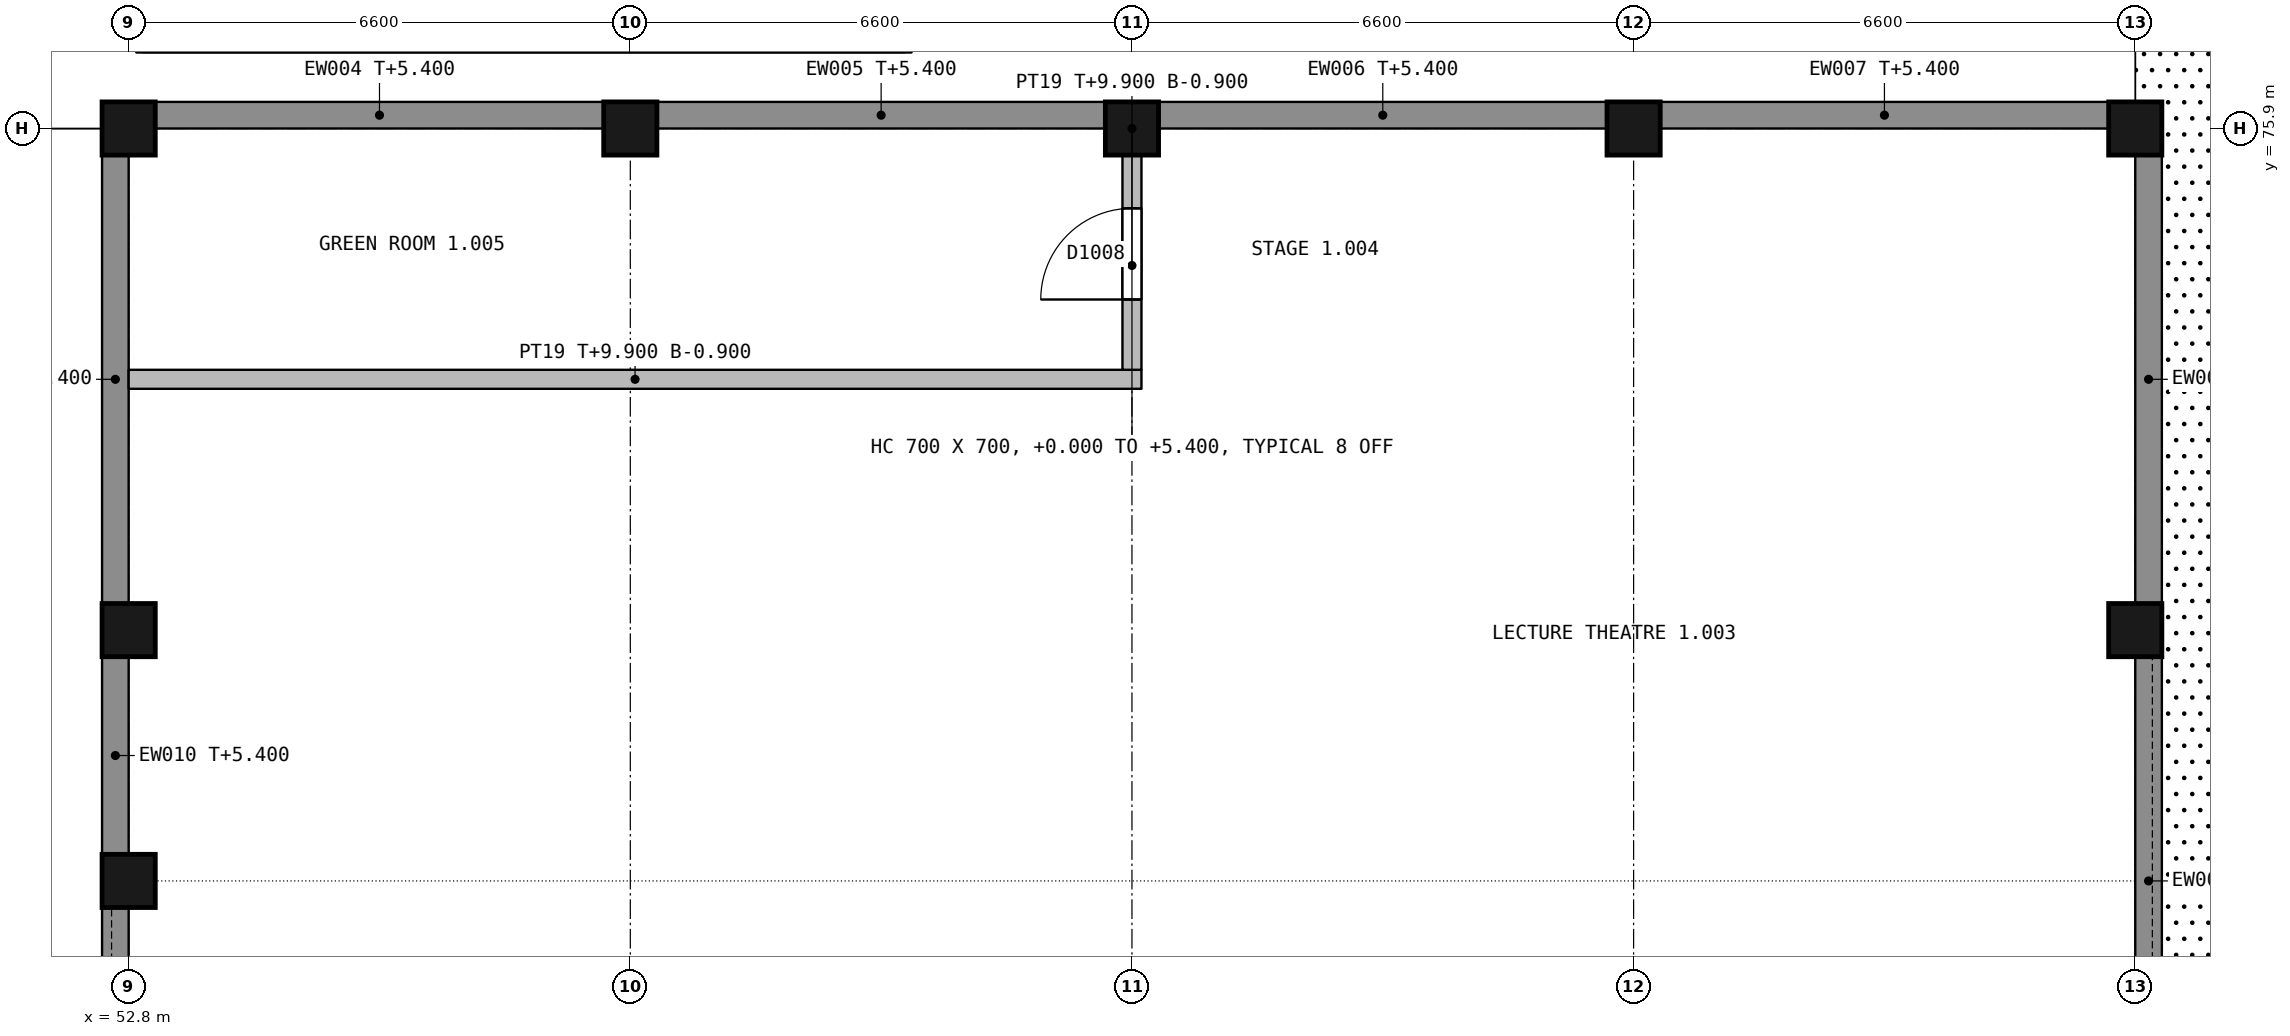
"""IFC4 building model, lengths in metres.
Left out: names, types, materials, properties, quantities, classifications, styles, units other than length and angle.
Written with IfcOpenShell. Run it as: python <this file> out.ifc"""

import sys

from ifc_helpers import new_model, si_unit, direction, frame, frame_2d, origin, origin_2d, place, context, subcontext, project, spatial, rectangle, extrude, element, fill, save


model = new_model("IFC4")
c1 = context("Model", 3, precision=1e-05, world=origin(), true_north=direction((0.0, 1.0)))
c2 = subcontext(c1, "Body", "Model", "MODEL_VIEW")
j1 = project(units=[si_unit("LENGTHUNIT", "METRE"), si_unit("PLANEANGLEUNIT", "RADIAN")], contexts=[c1])
p1 = place(None, origin())
s1 = spatial("IfcSite", under=j1, at=p1, CompositionType="ELEMENT")
p2 = place(p1, origin())
s2 = spatial("IfcBuilding", under=s1, at=p2, CompositionType="ELEMENT")
p3 = place(p2, origin())
s3 = spatial("IfcBuildingStorey", under=s2, at=p3, CompositionType="ELEMENT", Elevation=0.0)
for number, where, z_axis, x_axis in (
    (1, (52.8, 69.3, 0.0), (0.0, 0.0, 1.0), (1.0, 0.0, 0.0)),
    (2, (52.8, 75.9, 0.0), (0.0, 0.0, 1.0), (1.0, 0.0, 0.0)),
    (3, (79.2, 69.3, 0.0), (0.0, 0.0, 1.0), (1.0, 0.0, 0.0)),
    (4, (79.2, 75.9, 0.0), (0.0, 0.0, 1.0), (1.0, 0.0, 0.0)),
    (5, (59.4, 75.9, 0.0), (0.0, 0.0, 1.0), (1.0, 0.0, 0.0)),
    (6, (66.0, 75.9, 0.0), (0.0, 0.0, 1.0), (1.0, 0.0, 0.0)),
    (7, (72.6, 75.9, 0.0), (0.0, 0.0, 1.0), (1.0, 0.0, 0.0)),
    (8, (52.8, 66.0, 0.0), (0.0, 0.0, 1.0), (1.0, 0.0, 0.0)),
):
    element("IfcColumn", number, at=place(p3, frame(where, z_axis=z_axis, x_axis=x_axis)), inside=s3, PredefinedType="COLUMN", context=c2, shape_type="SweptSolid", body=[
        extrude(rectangle(XDim=0.7, YDim=0.7, at=origin_2d()), origin(), (0.0, 0.0, 1.0), 5.4),
    ])
p4 = place(p3, frame((79.375, 68.95, 0.0), z_axis=(0.0, 0.0, 1.0), x_axis=(0.0, -1.0, 0.0)))
e9 = element("IfcWall", 9, at=p4, inside=s3, PredefinedType="STANDARD", context=c2, shape_type="SweptSolid", body=[
    extrude(rectangle(XDim=5.9, YDim=0.35, at=frame_2d((2.95, 0.0))), origin(), (0.0, 0.0, 1.0), 4.35),
])
for number, where, z_axis, x_axis in (
    (10, (79.375, 75.55, 0.0), (0.0, 0.0, 1.0), (0.0, -1.0, 0.0)),
    (11, (53.15, 76.075, 0.0), (0.0, 0.0, 1.0), (1.0, 0.0, 0.0)),
):
    element("IfcWall", number, at=place(p3, frame(where, z_axis=z_axis, x_axis=x_axis)), inside=s3, PredefinedType="STANDARD", context=c2, shape_type="SweptSolid", body=[
        extrude(rectangle(XDim=5.9, YDim=0.35, at=frame_2d((2.95, 0.0))), origin(), (0.0, 0.0, 1.0), 5.4),
    ])
for number, where, z_axis, x_axis in (
    (12, (59.75, 76.075, 0.0), (0.0, 0.0, 1.0), (1.0, 0.0, 0.0)),
    (13, (66.35, 76.075, 0.0), (0.0, 0.0, 1.0), (1.0, 0.0, 0.0)),
):
    element("IfcWall", number, at=place(p3, frame(where, z_axis=z_axis, x_axis=x_axis)), inside=s3, PredefinedType="STANDARD", context=c2, shape_type="SweptSolid", body=[
        extrude(rectangle(XDim=5.9, YDim=0.35, at=frame_2d((2.95, 0.0))), origin(), (0.0, 0.0, 1.0), 5.4),
    ])
p5 = place(p3, frame((72.95, 76.075, 0.0), z_axis=(0.0, 0.0, 1.0), x_axis=(1.0, 0.0, 0.0)))
e14 = element("IfcWall", 14, at=p5, inside=s3, PredefinedType="STANDARD", context=c2, shape_type="SweptSolid", body=[
    extrude(rectangle(XDim=5.9, YDim=0.35, at=frame_2d((2.95, 0.0))), origin(), (0.0, 0.0, 1.0), 5.4),
])
p6 = place(p3, frame((52.625, 62.7, 0.0), z_axis=(0.0, 0.0, 1.0), x_axis=(0.0, 1.0, 0.0)))
e15 = element("IfcWall", 15, at=p6, inside=s3, PredefinedType="STANDARD", context=c2, shape_type="SweptSolid", body=[
    extrude(rectangle(XDim=2.95, YDim=0.35, at=frame_2d((1.475, 0.0))), origin(), (0.0, 0.0, 1.0), 4.35),
])
p7 = place(p3, frame((52.625, 66.35, 0.0), z_axis=(0.0, 0.0, 1.0), x_axis=(0.0, 1.0, 0.0)))
e16 = element("IfcWall", 16, at=p7, inside=s3, PredefinedType="STANDARD", context=c2, shape_type="SweptSolid", body=[
    extrude(rectangle(XDim=2.6, YDim=0.35, at=frame_2d((1.3, 0.0))), origin(), (0.0, 0.0, 1.0), 5.4),
])
p8 = place(p3, frame((52.625, 69.65, 0.0), z_axis=(0.0, 0.0, 1.0), x_axis=(0.0, 1.0, 0.0)))
e17 = element("IfcWall", 17, at=p8, inside=s3, PredefinedType="STANDARD", context=c2, shape_type="SweptSolid", body=[
    extrude(rectangle(XDim=5.9, YDim=0.35, at=frame_2d((2.95, 0.0))), origin(), (0.0, 0.0, 1.0), 5.4),
])
p9 = place(p3, frame((52.8, 72.6, -0.9), z_axis=(0.0, 0.0, 1.0), x_axis=(1.0, 0.0, 0.0)))
e18 = element("IfcWall", 18, at=p9, inside=s3, PredefinedType="PARTITIONING", context=c2, shape_type="SweptSolid", body=[
    extrude(rectangle(XDim=13.325, YDim=0.25, at=frame_2d((6.663, 0.0))), origin(), (0.0, 0.0, 1.0), 10.8),
])
p10 = place(p3, frame((66.0, 75.55, -0.9), z_axis=(0.0, 0.0, 1.0), x_axis=(0.0, -1.0, 0.0)))
e19 = element("IfcWall", 19, at=p10, inside=s3, PredefinedType="PARTITIONING", context=c2, shape_type="SweptSolid", body=[
    extrude(rectangle(XDim=2.825, YDim=0.25, at=frame_2d((1.413, 0.0))), origin(), (0.0, 0.0, 1.0), 10.8),
])
p11 = place(p10, frame((0.7, 0.0, 0.0)))
e20 = element("IfcOpeningElement", 20, at=p11, cuts=e19, PredefinedType="OPENING", context=c2, shape_type="SweptSolid", body=[
    extrude(rectangle(XDim=1.2, YDim=2.4, at=frame_2d((0.6, 1.2))), frame((0.0, 0.135, 0.0), z_axis=(0.0, -1.0, 0.0), x_axis=(1.0, 0.0, 0.0)), (0.0, 0.0, 1.0), 0.27),
])
p12 = place(p11, origin())
e21 = element("IfcDoor", 21, at=p12, inside=s3, OperationType="SINGLE_SWING_RIGHT", PredefinedType="DOOR", context=c2, shape_type="SweptSolid", body=[
    extrude(rectangle(XDim=1.2, YDim=2.4, at=frame_2d((0.6, 1.2))), frame((0.0, 0.025, 0.0), z_axis=(0.0, -1.0, 0.0), x_axis=(1.0, 0.0, 0.0)), (0.0, 0.0, 1.0), 0.05),
])
fill(e20, e21)
save(model, sys.argv[1])
